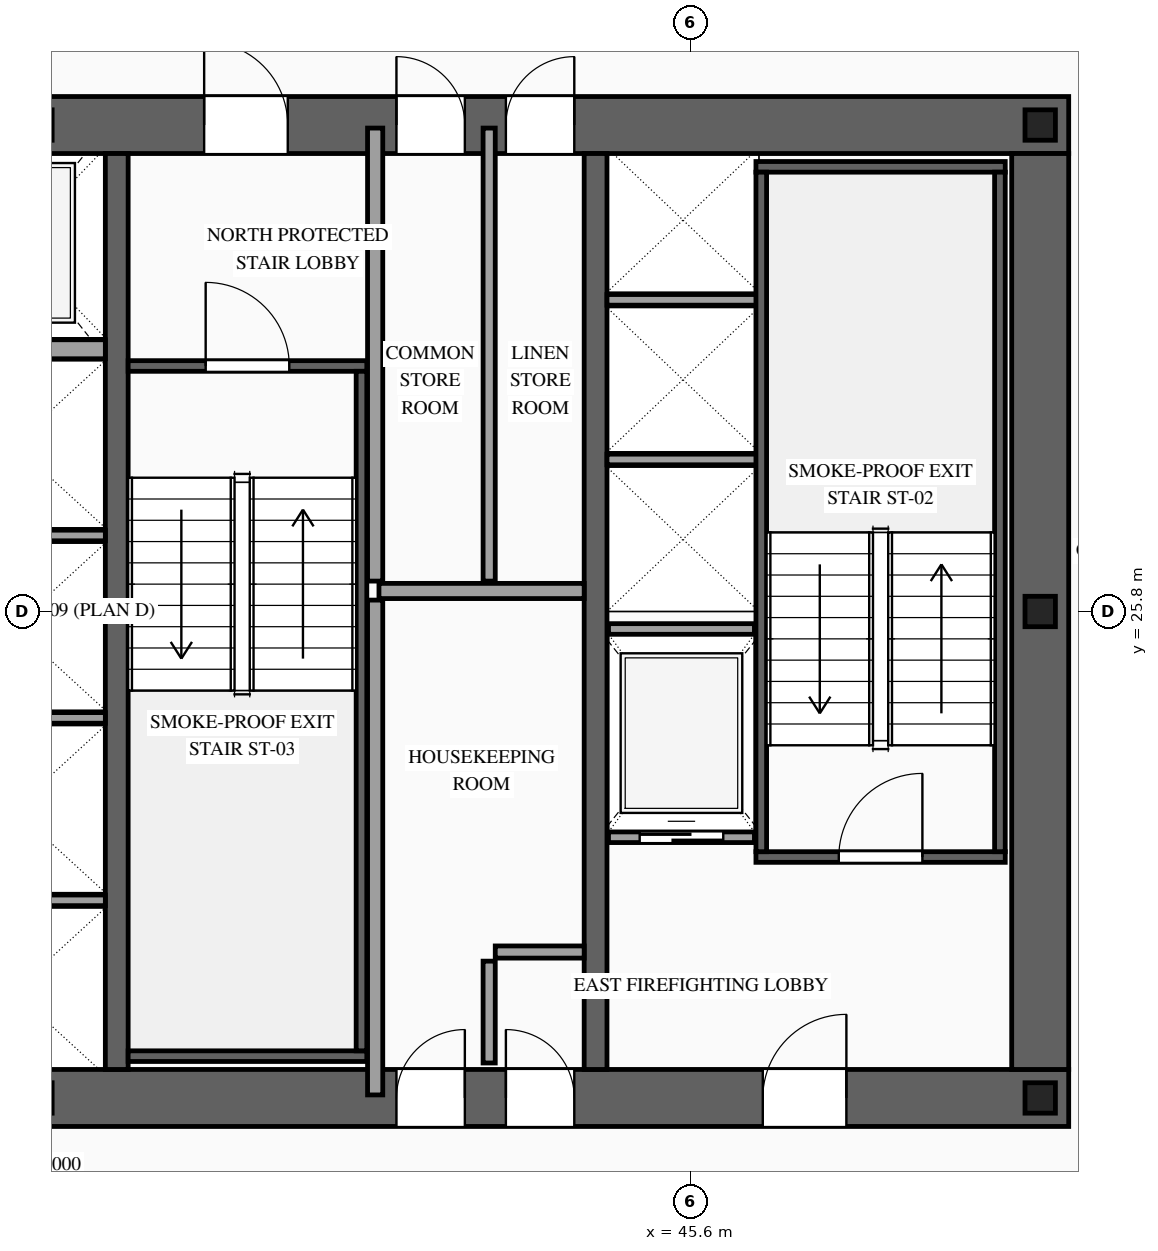
"""IFC4 building model, lengths in metres.
Left out: names, types, materials, properties, quantities, classifications, styles, units other than length and angle.
Written with IfcOpenShell. Run it as: python <this file> out.ifc"""

import sys

from ifc_helpers import new_model, si_unit, direction, frame, frame_2d, origin, origin_2d, place, context, subcontext, project, spatial, rectangle, i_section, extrude, source, transform, mapped, element, fill, save


model = new_model("IFC4")
c1 = context("Model", 3, precision=1e-05, world=origin(), true_north=direction((0.0, 1.0)))
c2 = subcontext(c1, "Body", "Model", "MODEL_VIEW")
j1 = project(units=[si_unit("LENGTHUNIT", "METRE"), si_unit("PLANEANGLEUNIT", "RADIAN")], contexts=[c1])
p1 = place(None, origin())
s1 = spatial("IfcSite", under=j1, at=p1, CompositionType="ELEMENT")
p2 = place(p1, origin())
s2 = spatial("IfcBuilding", under=s1, at=p2, CompositionType="ELEMENT")
p3 = place(p2, frame((0.0, 0.0, 156.0)))
s3 = spatial("IfcBuildingStorey", under=s2, at=p3, CompositionType="ELEMENT", Elevation=156.0)
p4 = place(p3, frame((23.425, 19.4, 0.0), z_axis=(0.0, 0.0, 1.0), x_axis=(1.0, 0.0, 0.0)))
e1 = element("IfcWall", 1, at=p4, inside=s3, PredefinedType="SHEAR", context=c2, shape_type="SweptSolid", body=[
    extrude(rectangle(XDim=27.15, YDim=0.75, at=frame_2d((13.575, 0.0))), origin(), (0.0, 0.0, 1.0), 3.6),
])
p5 = place(p4, frame((2.025, 0.0, 0.0)))
e2 = element("IfcOpeningElement", 2, at=p5, cuts=e1, PredefinedType="OPENING", context=c2, shape_type="SweptSolid", body=[
    extrude(rectangle(XDim=1.1, YDim=2.2, at=frame_2d((0.55, 1.1))), frame((0.0, 0.39, 0.0), z_axis=(0.0, -1.0, 0.0), x_axis=(1.0, 0.0, 0.0)), (0.0, 0.0, 1.0), 0.78),
])
p6 = place(p4, frame((9.925, 0.0, 0.0)))
e3 = element("IfcOpeningElement", 3, at=p6, cuts=e1, PredefinedType="OPENING", context=c2, shape_type="SweptSolid", body=[
    extrude(rectangle(XDim=1.1, YDim=2.2, at=frame_2d((0.55, 1.1))), frame((0.0, 0.39, 0.0), z_axis=(0.0, -1.0, 0.0), x_axis=(1.0, 0.0, 0.0)), (0.0, 0.0, 1.0), 0.78),
])
p7 = place(p4, frame((23.125, 0.0, 0.0)))
e4 = element("IfcOpeningElement", 4, at=p7, cuts=e1, PredefinedType="OPENING", context=c2, shape_type="SweptSolid", body=[
    extrude(rectangle(XDim=1.1, YDim=2.2, at=frame_2d((0.55, 1.1))), frame((0.0, 0.39, 0.0), z_axis=(0.0, -1.0, 0.0), x_axis=(1.0, 0.0, 0.0)), (0.0, 0.0, 1.0), 0.78),
])
p8 = place(p4, frame((19.745, 0.0, 0.0)))
e5 = element("IfcOpeningElement", 5, at=p8, cuts=e1, PredefinedType="OPENING", context=c2, shape_type="SweptSolid", body=[
    extrude(rectangle(XDim=0.9, YDim=2.15, at=frame_2d((0.45, 1.075))), frame((0.0, 0.39, 0.0), z_axis=(0.0, -1.0, 0.0), x_axis=(1.0, 0.0, 0.0)), (0.0, 0.0, 1.0), 0.78),
])
p9 = place(p4, frame((18.305, 0.0, 0.0)))
e6 = element("IfcOpeningElement", 6, at=p9, cuts=e1, PredefinedType="OPENING", context=c2, shape_type="SweptSolid", body=[
    extrude(rectangle(XDim=0.9, YDim=2.15, at=frame_2d((0.45, 1.075))), frame((0.0, 0.39, 0.0), z_axis=(0.0, -1.0, 0.0), x_axis=(1.0, 0.0, 0.0)), (0.0, 0.0, 1.0), 0.78),
])
p10 = place(p3, frame((23.425, 32.2, 0.0), z_axis=(0.0, 0.0, 1.0), x_axis=(1.0, 0.0, 0.0)))
e7 = element("IfcWall", 7, at=p10, inside=s3, PredefinedType="SHEAR", context=c2, shape_type="SweptSolid", body=[
    extrude(rectangle(XDim=27.15, YDim=0.75, at=frame_2d((13.575, 0.0))), origin(), (0.0, 0.0, 1.0), 3.6),
])
p11 = place(p10, frame((4.645, 0.0, 0.0)))
e8 = element("IfcOpeningElement", 8, at=p11, cuts=e7, PredefinedType="OPENING", context=c2, shape_type="SweptSolid", body=[
    extrude(rectangle(XDim=0.9, YDim=2.15, at=frame_2d((0.45, 1.075))), frame((0.0, 0.39, 0.0), z_axis=(0.0, -1.0, 0.0), x_axis=(1.0, 0.0, 0.0)), (0.0, 0.0, 1.0), 0.78),
])
p12 = place(p10, frame((9.925, 0.0, 0.0)))
e9 = element("IfcOpeningElement", 9, at=p12, cuts=e7, PredefinedType="OPENING", context=c2, shape_type="SweptSolid", body=[
    extrude(rectangle(XDim=1.1, YDim=2.2, at=frame_2d((0.55, 1.1))), frame((0.0, 0.39, 0.0), z_axis=(0.0, -1.0, 0.0), x_axis=(1.0, 0.0, 0.0)), (0.0, 0.0, 1.0), 0.78),
])
p13 = place(p10, frame((15.775, 0.0, 0.0)))
e10 = element("IfcOpeningElement", 10, at=p13, cuts=e7, PredefinedType="OPENING", context=c2, shape_type="SweptSolid", body=[
    extrude(rectangle(XDim=1.1, YDim=2.2, at=frame_2d((0.55, 1.1))), frame((0.0, 0.39, 0.0), z_axis=(0.0, -1.0, 0.0), x_axis=(1.0, 0.0, 0.0)), (0.0, 0.0, 1.0), 0.78),
])
p14 = place(p10, frame((18.305, 0.0, 0.0)))
e11 = element("IfcOpeningElement", 11, at=p14, cuts=e7, PredefinedType="OPENING", context=c2, shape_type="SweptSolid", body=[
    extrude(rectangle(XDim=0.9, YDim=2.15, at=frame_2d((0.45, 1.075))), frame((0.0, 0.39, 0.0), z_axis=(0.0, -1.0, 0.0), x_axis=(1.0, 0.0, 0.0)), (0.0, 0.0, 1.0), 0.78),
])
p15 = place(p10, frame((19.745, 0.0, 0.0)))
e12 = element("IfcOpeningElement", 12, at=p15, cuts=e7, PredefinedType="OPENING", context=c2, shape_type="SweptSolid", body=[
    extrude(rectangle(XDim=0.9, YDim=2.15, at=frame_2d((0.45, 1.075))), frame((0.0, 0.39, 0.0), z_axis=(0.0, -1.0, 0.0), x_axis=(1.0, 0.0, 0.0)), (0.0, 0.0, 1.0), 0.78),
])
m1 = source(origin(), c2, "Body", "SweptSolid", [
    extrude(rectangle(XDim=12.05, YDim=0.75, at=frame_2d((6.025, 0.0))), origin(), (0.0, 0.0, 1.0), 3.6),
])
p16 = place(p3, frame((50.2, 19.775, 0.0), z_axis=(0.0, 0.0, 1.0), x_axis=(0.0, 1.0, 0.0)))
e13 = element("IfcWall", 13, at=p16, inside=s3, PredefinedType="SHEAR", context=c2, shape_type="MappedRepresentation", body=[
    mapped(m1, transform((0.0, 0.0, 0.0), scale=1.0)),
])
m2 = source(origin(), c2, "Body", "SweptSolid", [
    extrude(rectangle(XDim=12.05, YDim=0.3, at=frame_2d((6.025, 0.0))), origin(), (0.0, 0.0, 1.0), 3.6),
])
for number, where, z_axis, x_axis in (
    (14, (38.05, 19.775, 0.0), (0.0, 0.0, 1.0), (0.0, 1.0, 0.0)),
    (15, (44.35, 19.775, 0.0), (0.0, 0.0, 1.0), (0.0, 1.0, 0.0)),
):
    element("IfcWall", number, at=place(p3, frame(where, z_axis=z_axis, x_axis=x_axis)), inside=s3, PredefinedType="SOLIDWALL", context=c2, shape_type="MappedRepresentation", body=[
        mapped(m2, transform((0.0, 0.0, 0.0), scale=1.0)),
    ])
m3 = source(origin(), c2, "Body", "SweptSolid", [
    extrude(i_section(OverallWidth=0.4, OverallDepth=0.4, WebThickness=0.013, FlangeThickness=0.021, at=origin_2d()), origin(), (0.0, 0.0, 1.0), 3.6),
])
for number, where, z_axis, x_axis in (
    (16, (50.2, 19.4, 0.0), (0.0, 0.0, 1.0), (1.0, 0.0, 0.0)),
    (17, (50.2, 25.8, 0.0), (0.0, 0.0, 1.0), (1.0, 0.0, 0.0)),
    (18, (50.2, 32.2, 0.0), (0.0, 0.0, 1.0), (1.0, 0.0, 0.0)),
):
    element("IfcColumn", number, at=place(p3, frame(where, z_axis=z_axis, x_axis=x_axis)), inside=s3, PredefinedType="COLUMN", context=c2, shape_type="MappedRepresentation", body=[
        mapped(m3, transform((0.0, 0.0, 0.0), scale=1.0)),
    ])
p17 = place(p3, frame((44.52, 22.83, 0.0), z_axis=(0.0, 0.0, 1.0), x_axis=(1.0, 0.0, 0.0)))
e19 = element("IfcWall", 19, at=p17, inside=s3, PredefinedType="SOLIDWALL", context=c2, shape_type="SweptSolid", body=[
    extrude(rectangle(XDim=1.92, YDim=0.14, at=frame_2d((0.96, 0.0))), origin(), (0.0, 0.0, 1.0), 3.38),
])
p18 = place(p17, frame((0.41, 0.0, 0.0)))
e20 = element("IfcOpeningElement", 20, at=p18, cuts=e19, PredefinedType="OPENING", context=c2, shape_type="SweptSolid", body=[
    extrude(rectangle(XDim=1.1, YDim=2.2, at=frame_2d((0.55, 1.1))), frame((0.0, 0.085, 0.0), z_axis=(0.0, -1.0, 0.0), x_axis=(1.0, 0.0, 0.0)), (0.0, 0.0, 1.0), 0.17),
])
m4 = source(origin(), c2, "Body", "SweptSolid", [
    extrude(rectangle(XDim=1.92, YDim=0.14, at=frame_2d((0.96, 0.0))), origin(), (0.0, 0.0, 1.0), 3.38),
])
p19 = place(p3, frame((44.52, 25.57, 0.0), z_axis=(0.0, 0.0, 1.0), x_axis=(1.0, 0.0, 0.0)))
e21 = element("IfcWall", 21, at=p19, inside=s3, PredefinedType="SOLIDWALL", context=c2, shape_type="MappedRepresentation", body=[
    mapped(m4, transform((0.0, 0.0, 0.0), scale=1.0)),
])
m5 = source(origin(), c2, "Body", "SweptSolid", [
    extrude(rectangle(XDim=2.4, YDim=0.14, at=frame_2d((1.2, 0.0))), origin(), (0.0, 0.0, 1.0), 3.38),
])
for number, where, z_axis, x_axis in (
    (22, (35.5, 22.0, 0.0), (0.0, 0.0, 1.0), (1.0, 0.0, 0.0)),
    (23, (35.5, 24.4, 0.0), (0.0, 0.0, 1.0), (1.0, 0.0, 0.0)),
    (24, (35.5, 26.8, 0.0), (0.0, 0.0, 1.0), (1.0, 0.0, 0.0)),
):
    element("IfcWall", number, at=place(p3, frame(where, z_axis=z_axis, x_axis=x_axis)), inside=s3, PredefinedType="SOLIDWALL", context=c2, shape_type="MappedRepresentation", body=[
        mapped(m5, transform((0.0, 0.0, 0.0), scale=1.0)),
    ])
m6 = source(origin(), c2, "Body", "SweptSolid", [
    extrude(rectangle(XDim=2.4, YDim=0.25, at=frame_2d((1.2, 0.0))), origin(), (0.0, 0.0, 1.0), 3.38),
])
p20 = place(p3, frame((35.5, 29.25, 0.0), z_axis=(0.0, 0.0, 1.0), x_axis=(1.0, 0.0, 0.0)))
e25 = element("IfcWall", 25, at=p20, inside=s3, PredefinedType="SOLIDWALL", context=c2, shape_type="MappedRepresentation", body=[
    mapped(m6, transform((0.0, 0.0, 0.0), scale=1.0)),
])
m7 = source(origin(), c2, "Body", "SweptSolid", [
    extrude(rectangle(XDim=2.0, YDim=0.14, at=frame_2d((1.0, 0.0))), origin(), (0.0, 0.0, 1.0), 3.38),
])
for number, where, z_axis, x_axis in (
    (26, (44.5, 27.8, 0.0), (0.0, 0.0, 1.0), (1.0, 0.0, 0.0)),
    (27, (44.5, 29.9, 0.0), (0.0, 0.0, 1.0), (1.0, 0.0, 0.0)),
):
    element("IfcWall", number, at=place(p3, frame(where, z_axis=z_axis, x_axis=x_axis)), inside=s3, PredefinedType="SOLIDWALL", context=c2, shape_type="MappedRepresentation", body=[
        mapped(m7, transform((0.0, 0.0, 0.0), scale=1.0)),
    ])
p21 = place(p3, frame((46.46, 22.57, 0.0), z_axis=(0.0, 0.0, 1.0), x_axis=(1.0, 0.0, 0.0)))
e28 = element("IfcWall", 28, at=p21, inside=s3, PredefinedType="SOLIDWALL", context=c2, shape_type="SweptSolid", body=[
    extrude(rectangle(XDim=3.28, YDim=0.14, at=frame_2d((1.64, 0.0))), origin(), (0.0, 0.0, 1.0), 3.38),
])
p22 = place(p21, frame((1.09, 0.0, 0.0)))
e29 = element("IfcOpeningElement", 29, at=p22, cuts=e28, PredefinedType="OPENING", context=c2, shape_type="SweptSolid", body=[
    extrude(rectangle(XDim=1.1, YDim=2.2, at=frame_2d((0.55, 1.1))), frame((0.0, 0.085, 0.0), z_axis=(0.0, -1.0, 0.0), x_axis=(1.0, 0.0, 0.0)), (0.0, 0.0, 1.0), 0.17),
])
m8 = source(origin(), c2, "Body", "SweptSolid", [
    extrude(rectangle(XDim=3.28, YDim=0.14, at=frame_2d((1.64, 0.0))), origin(), (0.0, 0.0, 1.0), 3.38),
])
p23 = place(p3, frame((46.46, 31.65, 0.0), z_axis=(0.0, 0.0, 1.0), x_axis=(1.0, 0.0, 0.0)))
e30 = element("IfcWall", 30, at=p23, inside=s3, PredefinedType="SOLIDWALL", context=c2, shape_type="MappedRepresentation", body=[
    mapped(m8, transform((0.0, 0.0, 0.0), scale=1.0)),
])
m9 = source(origin(), c2, "Body", "SweptSolid", [
    extrude(rectangle(XDim=8.94, YDim=0.14, at=frame_2d((4.47, 0.0))), origin(), (0.0, 0.0, 1.0), 3.38),
])
for number, where, z_axis, x_axis in (
    (31, (46.53, 22.64, 0.0), (0.0, 0.0, 1.0), (0.0, 1.0, 0.0)),
    (32, (49.67, 22.64, 0.0), (0.0, 0.0, 1.0), (0.0, 1.0, 0.0)),
):
    element("IfcWall", number, at=place(p3, frame(where, z_axis=z_axis, x_axis=x_axis)), inside=s3, PredefinedType="SOLIDWALL", context=c2, shape_type="MappedRepresentation", body=[
        mapped(m9, transform((0.0, 0.0, 0.0), scale=1.0)),
    ])
p24 = place(p3, frame((38.2, 29.03, 0.0), z_axis=(0.0, 0.0, 1.0), x_axis=(1.0, 0.0, 0.0)))
e33 = element("IfcWall", 33, at=p24, inside=s3, PredefinedType="SOLIDWALL", context=c2, shape_type="SweptSolid", body=[
    extrude(rectangle(XDim=3.14, YDim=0.14, at=frame_2d((1.57, 0.0))), origin(), (0.0, 0.0, 1.0), 3.38),
])
p25 = place(p24, frame((1.02, 0.0, 0.0)))
e34 = element("IfcOpeningElement", 34, at=p25, cuts=e33, PredefinedType="OPENING", context=c2, shape_type="SweptSolid", body=[
    extrude(rectangle(XDim=1.1, YDim=2.2, at=frame_2d((0.55, 1.1))), frame((0.0, 0.085, 0.0), z_axis=(0.0, -1.0, 0.0), x_axis=(1.0, 0.0, 0.0)), (0.0, 0.0, 1.0), 0.17),
])
m10 = source(origin(), c2, "Body", "SweptSolid", [
    extrude(rectangle(XDim=3.14, YDim=0.14, at=frame_2d((1.57, 0.0))), origin(), (0.0, 0.0, 1.0), 3.38),
])
p26 = place(p3, frame((38.2, 19.95, 0.0), z_axis=(0.0, 0.0, 1.0), x_axis=(1.0, 0.0, 0.0)))
e35 = element("IfcWall", 35, at=p26, inside=s3, PredefinedType="SOLIDWALL", context=c2, shape_type="MappedRepresentation", body=[
    mapped(m10, transform((0.0, 0.0, 0.0), scale=1.0)),
])
m11 = source(origin(), c2, "Body", "SweptSolid", [
    extrude(rectangle(XDim=8.94, YDim=0.14, at=frame_2d((4.47, 0.0))), origin(), (0.0, 0.0, 1.0), 3.38),
])
p27 = place(p3, frame((41.27, 20.02, 0.0), z_axis=(0.0, 0.0, 1.0), x_axis=(0.0, 1.0, 0.0)))
e36 = element("IfcWall", 36, at=p27, inside=s3, PredefinedType="SOLIDWALL", context=c2, shape_type="MappedRepresentation", body=[
    mapped(m11, transform((0.0, 0.0, 0.0), scale=1.0)),
])
m12 = source(origin(), c2, "Body", "SweptSolid", [
    extrude(rectangle(XDim=1.34, YDim=0.16, at=frame_2d((0.67, 0.0))), origin(), (0.0, 0.0, 1.0), 3.38),
])
p28 = place(p3, frame((42.95, 19.86, 0.0), z_axis=(0.0, 0.0, 1.0), x_axis=(0.0, 1.0, 0.0)))
e37 = element("IfcWall", 37, at=p28, inside=s3, PredefinedType="PARTITIONING", context=c2, shape_type="MappedRepresentation", body=[
    mapped(m12, transform((0.0, 0.0, 0.0), scale=1.0)),
])
m13 = source(origin(), c2, "Body", "SweptSolid", [
    extrude(rectangle(XDim=1.17, YDim=0.16, at=frame_2d((0.585, 0.0))), origin(), (0.0, 0.0, 1.0), 3.38),
])
p29 = place(p3, frame((43.03, 21.32, 0.0), z_axis=(0.0, 0.0, 1.0), x_axis=(1.0, 0.0, 0.0)))
e38 = element("IfcWall", 38, at=p29, inside=s3, PredefinedType="PARTITIONING", context=c2, shape_type="MappedRepresentation", body=[
    mapped(m13, transform((0.0, 0.0, 0.0), scale=1.0)),
])
m14 = source(origin(), c2, "Body", "SweptSolid", [
    extrude(rectangle(XDim=6.51, YDim=0.2, at=frame_2d((3.255, 0.0))), origin(), (0.0, 0.0, 1.0), 3.38),
])
p30 = place(p3, frame((41.45, 19.44, 0.0), z_axis=(0.0, 0.0, 1.0), x_axis=(0.0, 1.0, 0.0)))
e39 = element("IfcWall", 39, at=p30, inside=s3, PredefinedType="PARTITIONING", context=c2, shape_type="MappedRepresentation", body=[
    mapped(m14, transform((0.0, 0.0, 0.0), scale=1.0)),
])
m15 = source(origin(), c2, "Body", "SweptSolid", [
    extrude(rectangle(XDim=2.7, YDim=0.2, at=frame_2d((1.35, 0.0))), origin(), (0.0, 0.0, 1.0), 3.38),
])
p31 = place(p3, frame((41.5, 26.07, 0.0), z_axis=(0.0, 0.0, 1.0), x_axis=(1.0, 0.0, 0.0)))
e40 = element("IfcWall", 40, at=p31, inside=s3, PredefinedType="PARTITIONING", context=c2, shape_type="MappedRepresentation", body=[
    mapped(m15, transform((0.0, 0.0, 0.0), scale=1.0)),
])
m16 = source(origin(), c2, "Body", "SweptSolid", [
    extrude(rectangle(XDim=5.96, YDim=0.2, at=frame_2d((2.98, 0.0))), origin(), (0.0, 0.0, 1.0), 3.38),
])
p32 = place(p3, frame((41.45, 26.2, 0.0), z_axis=(0.0, 0.0, 1.0), x_axis=(0.0, 1.0, 0.0)))
e41 = element("IfcWall", 41, at=p32, inside=s3, PredefinedType="PARTITIONING", context=c2, shape_type="MappedRepresentation", body=[
    mapped(m16, transform((0.0, 0.0, 0.0), scale=1.0)),
])
m17 = source(origin(), c2, "Body", "SweptSolid", [
    extrude(rectangle(XDim=5.96, YDim=0.16, at=frame_2d((2.98, 0.0))), origin(), (0.0, 0.0, 1.0), 3.38),
])
p33 = place(p3, frame((42.95, 26.2, 0.0), z_axis=(0.0, 0.0, 1.0), x_axis=(0.0, 1.0, 0.0)))
e42 = element("IfcWall", 42, at=p33, inside=s3, PredefinedType="PARTITIONING", context=c2, shape_type="MappedRepresentation", body=[
    mapped(m17, transform((0.0, 0.0, 0.0), scale=1.0)),
])
m18 = source(origin(), c2, "Body", "SweptSolid", [
    extrude(rectangle(XDim=1.1, YDim=2.2, at=frame_2d((0.55, 1.1))), frame((0.0, 0.025, 0.0), z_axis=(0.0, -1.0, 0.0), x_axis=(1.0, 0.0, 0.0)), (0.0, 0.0, 1.0), 0.05),
])
p34 = place(p18, origin())
e43 = element("IfcDoor", 43, at=p34, inside=s3, OperationType="SLIDING_TO_RIGHT", PredefinedType="DOOR", context=c2, shape_type="MappedRepresentation", body=[
    mapped(m18, transform((0.0, 0.0, 0.0), scale=1.0)),
])
fill(e20, e43)
m19 = source(origin(), c2, "Body", "SweptSolid", [
    extrude(rectangle(XDim=1.1, YDim=2.2, at=frame_2d((0.55, 1.1))), frame((0.0, 0.025, 0.0), z_axis=(0.0, -1.0, 0.0), x_axis=(1.0, 0.0, 0.0)), (0.0, 0.0, 1.0), 0.05),
])
p35 = place(p22, origin())
e44 = element("IfcDoor", 44, at=p35, inside=s3, OperationType="SINGLE_SWING_RIGHT", PredefinedType="DOOR", context=c2, shape_type="MappedRepresentation", body=[
    mapped(m19, transform((0.0, 0.0, 0.0), scale=1.0)),
])
fill(e29, e44)
p36 = place(p25, origin())
e45 = element("IfcDoor", 45, at=p36, inside=s3, OperationType="SINGLE_SWING_LEFT", PredefinedType="DOOR", context=c2, shape_type="MappedRepresentation", body=[
    mapped(m19, transform((0.0, 0.0, 0.0), scale=1.0)),
])
fill(e34, e45)
p37 = place(p7, origin())
e46 = element("IfcDoor", 46, at=p37, inside=s3, OperationType="SINGLE_SWING_RIGHT", PredefinedType="DOOR", context=c2, shape_type="MappedRepresentation", body=[
    mapped(m19, transform((0.0, 0.0, 0.0), scale=1.0)),
])
fill(e4, e46)
p38 = place(p13, origin())
e47 = element("IfcDoor", 47, at=p38, inside=s3, OperationType="SINGLE_SWING_LEFT", PredefinedType="DOOR", context=c2, shape_type="MappedRepresentation", body=[
    mapped(m19, transform((0.0, 0.0, 0.0), scale=1.0)),
])
fill(e10, e47)
m20 = source(origin(), c2, "Body", "SweptSolid", [
    extrude(rectangle(XDim=0.9, YDim=2.15, at=frame_2d((0.45, 1.075))), frame((0.0, 0.025, 0.0), z_axis=(0.0, -1.0, 0.0), x_axis=(1.0, 0.0, 0.0)), (0.0, 0.0, 1.0), 0.05),
])
p39 = place(p8, origin())
e48 = element("IfcDoor", 48, at=p39, inside=s3, OperationType="SINGLE_SWING_LEFT", PredefinedType="DOOR", context=c2, shape_type="MappedRepresentation", body=[
    mapped(m20, transform((0.0, 0.0, 0.0), scale=1.0)),
])
fill(e5, e48)
p40 = place(p9, origin())
e49 = element("IfcDoor", 49, at=p40, inside=s3, OperationType="SINGLE_SWING_RIGHT", PredefinedType="DOOR", context=c2, shape_type="MappedRepresentation", body=[
    mapped(m20, transform((0.0, 0.0, 0.0), scale=1.0)),
])
fill(e6, e49)
p41 = place(p14, origin())
e50 = element("IfcDoor", 50, at=p41, inside=s3, OperationType="SINGLE_SWING_LEFT", PredefinedType="DOOR", context=c2, shape_type="MappedRepresentation", body=[
    mapped(m20, transform((0.0, 0.0, 0.0), scale=1.0)),
])
fill(e11, e50)
p42 = place(p15, origin())
e51 = element("IfcDoor", 51, at=p42, inside=s3, OperationType="SINGLE_SWING_RIGHT", PredefinedType="DOOR", context=c2, shape_type="MappedRepresentation", body=[
    mapped(m20, transform((0.0, 0.0, 0.0), scale=1.0)),
])
fill(e12, e51)
save(model, sys.argv[1])
